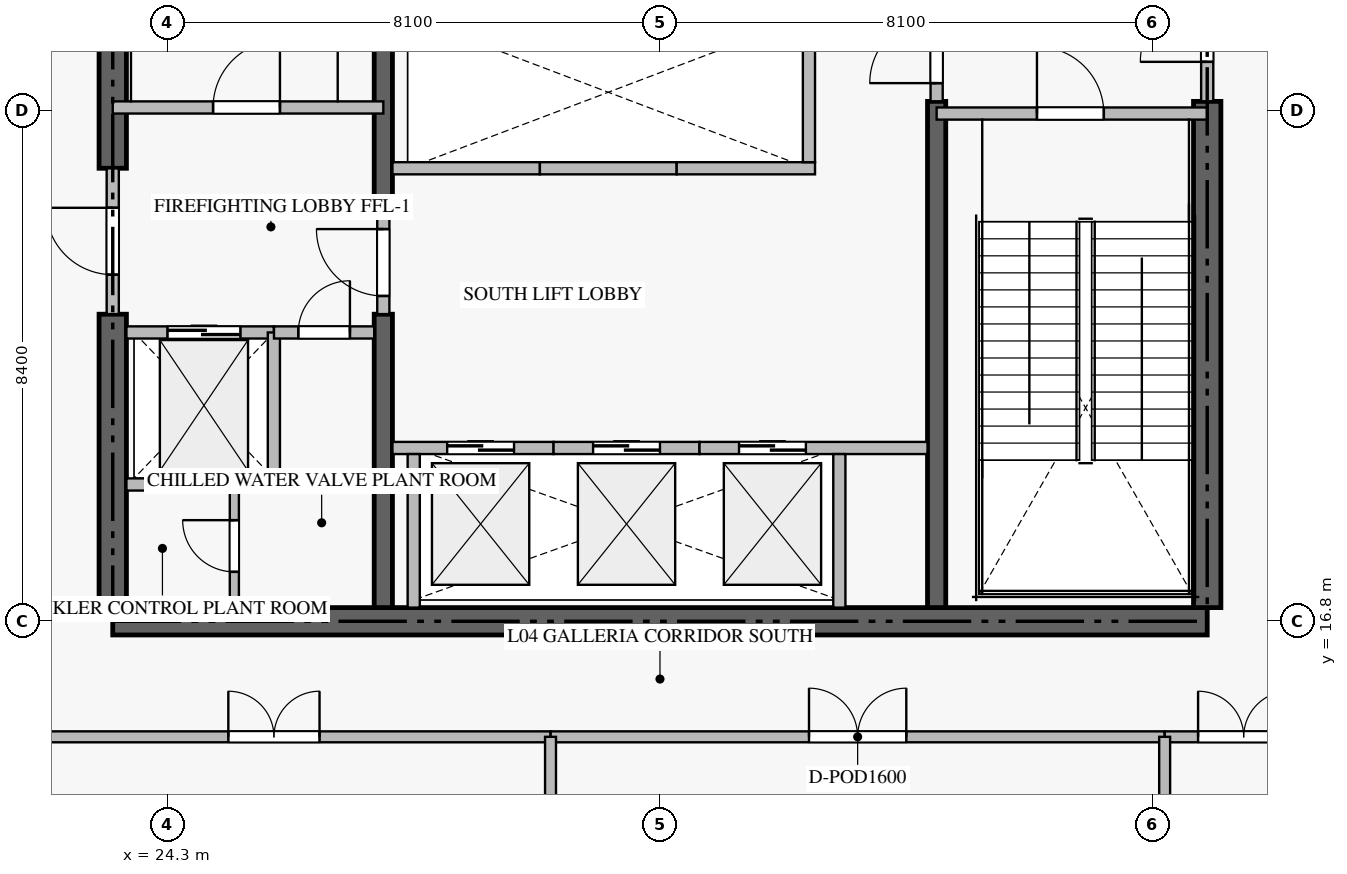
"""IFC4 building model, lengths in metres.
Left out: names, types, materials, properties, quantities, classifications, styles, units other than length and angle.
Written with IfcOpenShell. Run it as: python <this file> out.ifc"""

import sys

from ifc_helpers import new_model, si_unit, direction, frame, frame_2d, origin, place, context, subcontext, project, spatial, rectangle, extrude, source, transform, mapped, element, fill, save


model = new_model("IFC4")
c1 = context("Model", 3, precision=1e-05, world=origin(), true_north=direction((0.0, 1.0)))
c2 = subcontext(c1, "Body", "Model", "MODEL_VIEW")
j1 = project(units=[si_unit("LENGTHUNIT", "METRE"), si_unit("PLANEANGLEUNIT", "RADIAN")], contexts=[c1])
p1 = place(None, origin())
s1 = spatial("IfcSite", under=j1, at=p1, CompositionType="ELEMENT")
p2 = place(p1, origin())
s2 = spatial("IfcBuilding", under=s1, at=p2, CompositionType="ELEMENT")
p3 = place(p2, frame((0.0, 0.0, 21.0)))
s3 = spatial("IfcBuildingStorey", under=s2, at=p3, CompositionType="ELEMENT", Elevation=21.0)
p4 = place(p3, frame((23.4, 16.8, -0.85), z_axis=(0.0, 0.0, 1.0), x_axis=(1.0, 0.0, 0.0)))
e1 = element("IfcWall", 1, at=p4, inside=s3, PredefinedType="SHEAR", context=c2, shape_type="SweptSolid", body=[
    extrude(rectangle(XDim=18.0, YDim=0.45, at=frame_2d((9.0, 0.0))), origin(), (0.0, 0.0, 1.0), 6.108),
])
p5 = place(p3, frame((23.4, 17.025, -0.85), z_axis=(0.0, 0.0, 1.0), x_axis=(0.0, 1.0, 0.0)))
e2 = element("IfcWall", 2, at=p5, inside=s3, PredefinedType="SHEAR", context=c2, shape_type="SweptSolid", body=[
    extrude(rectangle(XDim=4.825, YDim=0.45, at=frame_2d((2.413, 0.0))), origin(), (0.0, 0.0, 1.0), 6.108),
])
p6 = place(p3, frame((23.4, 24.25, -0.85), z_axis=(0.0, 0.0, 1.0), x_axis=(0.0, 1.0, 0.0)))
e3 = element("IfcWall", 3, at=p6, inside=s3, PredefinedType="SHEAR", context=c2, shape_type="SweptSolid", body=[
    extrude(rectangle(XDim=9.125, YDim=0.45, at=frame_2d((4.562, 0.0))), origin(), (0.0, 0.0, 1.0), 6.108),
])
p7 = place(p3, frame((41.4, 17.025, -0.85), z_axis=(0.0, 0.0, 1.0), x_axis=(0.0, 1.0, 0.0)))
e4 = element("IfcWall", 4, at=p7, inside=s3, PredefinedType="SHEAR", context=c2, shape_type="SweptSolid", body=[
    extrude(rectangle(XDim=8.325, YDim=0.45, at=frame_2d((4.163, 0.0))), origin(), (0.0, 0.0, 1.0), 6.108),
])
p8 = place(p3, frame((27.85, 17.025, -0.85), z_axis=(0.0, 0.0, 1.0), x_axis=(0.0, 1.0, 0.0)))
e5 = element("IfcWall", 5, at=p8, inside=s3, PredefinedType="SHEAR", context=c2, shape_type="SweptSolid", body=[
    extrude(rectangle(XDim=4.825, YDim=0.3, at=frame_2d((2.413, 0.0))), origin(), (0.0, 0.0, 1.0), 6.108),
])
p9 = place(p3, frame((27.85, 23.55, -0.85), z_axis=(0.0, 0.0, 1.0), x_axis=(0.0, 1.0, 0.0)))
e6 = element("IfcWall", 6, at=p9, inside=s3, PredefinedType="SHEAR", context=c2, shape_type="SweptSolid", body=[
    extrude(rectangle(XDim=9.825, YDim=0.3, at=frame_2d((4.913, 0.0))), origin(), (0.0, 0.0, 1.0), 6.108),
])
p10 = place(p3, frame((36.95, 17.025, -0.85), z_axis=(0.0, 0.0, 1.0), x_axis=(0.0, 1.0, 0.0)))
e7 = element("IfcWall", 7, at=p10, inside=s3, PredefinedType="SHEAR", context=c2, shape_type="SweptSolid", body=[
    extrude(rectangle(XDim=8.325, YDim=0.3, at=frame_2d((4.163, 0.0))), origin(), (0.0, 0.0, 1.0), 6.108),
])
p11 = place(p3, frame((23.4, 25.25, 0.0), z_axis=(0.0, 0.0, 1.0), x_axis=(1.0, 0.0, 0.0)))
e8 = element("IfcWall", 8, at=p11, inside=s3, PredefinedType="STANDARD", context=c2, shape_type="SweptSolid", body=[
    extrude(rectangle(XDim=4.45, YDim=0.2, at=frame_2d((2.225, 0.0))), origin(), (0.0, 0.0, 1.0), 5.26),
])
p12 = place(p11, frame((1.65, 0.0, 0.0)))
e9 = element("IfcOpeningElement", 9, at=p12, cuts=e8, PredefinedType="OPENING", context=c2, shape_type="SweptSolid", body=[
    extrude(rectangle(XDim=1.1, YDim=2.15, at=frame_2d((0.55, 1.075))), frame((0.0, 0.11, 0.0), z_axis=(0.0, -1.0, 0.0), x_axis=(1.0, 0.0, 0.0)), (0.0, 0.0, 1.0), 0.22),
])
p13 = place(p3, frame((36.95, 25.15, 0.0), z_axis=(0.0, 0.0, 1.0), x_axis=(1.0, 0.0, 0.0)))
e10 = element("IfcWall", 10, at=p13, inside=s3, PredefinedType="STANDARD", context=c2, shape_type="SweptSolid", body=[
    extrude(rectangle(XDim=4.45, YDim=0.2, at=frame_2d((2.225, 0.0))), origin(), (0.0, 0.0, 1.0), 5.26),
])
p14 = place(p13, frame((1.65, 0.0, 0.0)))
e11 = element("IfcOpeningElement", 11, at=p14, cuts=e10, PredefinedType="OPENING", context=c2, shape_type="SweptSolid", body=[
    extrude(rectangle(XDim=1.1, YDim=2.15, at=frame_2d((0.55, 1.075))), frame((0.0, 0.11, 0.0), z_axis=(0.0, -1.0, 0.0), x_axis=(1.0, 0.0, 0.0)), (0.0, 0.0, 1.0), 0.22),
])
p15 = place(p3, frame((23.625, 21.55, 0.0), z_axis=(0.0, 0.0, 1.0), x_axis=(1.0, 0.0, 0.0)))
e12 = element("IfcWall", 12, at=p15, inside=s3, PredefinedType="STANDARD", context=c2, shape_type="SweptSolid", body=[
    extrude(rectangle(XDim=2.425, YDim=0.2, at=frame_2d((1.212, 0.0))), origin(), (0.0, 0.0, 1.0), 5.26),
])
p16 = place(p15, frame((0.675, 0.0, 0.0)))
e13 = element("IfcOpeningElement", 13, at=p16, cuts=e12, PredefinedType="OPENING", context=c2, shape_type="SweptSolid", body=[
    extrude(rectangle(XDim=1.2, YDim=2.2, at=frame_2d((0.6, 1.1))), frame((0.0, 0.11, 0.0), z_axis=(0.0, -1.0, 0.0), x_axis=(1.0, 0.0, 0.0)), (0.0, 0.0, 1.0), 0.22),
])
p17 = place(p3, frame((28.0, 19.65, 0.0), z_axis=(0.0, 0.0, 1.0), x_axis=(1.0, 0.0, 0.0)))
e14 = element("IfcWall", 14, at=p17, inside=s3, PredefinedType="STANDARD", context=c2, shape_type="SweptSolid", body=[
    extrude(rectangle(XDim=2.65, YDim=0.2, at=frame_2d((1.325, 0.0))), origin(), (0.0, 0.0, 1.0), 5.26),
])
p18 = place(p17, frame((0.9, 0.0, 0.0)))
e15 = element("IfcOpeningElement", 15, at=p18, cuts=e14, PredefinedType="OPENING", context=c2, shape_type="SweptSolid", body=[
    extrude(rectangle(XDim=1.1, YDim=2.2, at=frame_2d((0.55, 1.1))), frame((0.0, 0.11, 0.0), z_axis=(0.0, -1.0, 0.0), x_axis=(1.0, 0.0, 0.0)), (0.0, 0.0, 1.0), 0.22),
])
p19 = place(p3, frame((28.35, 17.025, 0.0), z_axis=(0.0, 0.0, 1.0), x_axis=(0.0, 1.0, 0.0)))
e16 = element("IfcWall", 16, at=p19, inside=s3, PredefinedType="STANDARD", context=c2, shape_type="SweptSolid", body=[
    extrude(rectangle(XDim=2.525, YDim=0.2, at=frame_2d((1.263, 0.0))), origin(), (0.0, 0.0, 1.0), 5.26),
])
p20 = place(p3, frame((30.65, 19.65, 0.0), z_axis=(0.0, 0.0, 1.0), x_axis=(1.0, 0.0, 0.0)))
e17 = element("IfcWall", 17, at=p20, inside=s3, PredefinedType="STANDARD", context=c2, shape_type="SweptSolid", body=[
    extrude(rectangle(XDim=2.4, YDim=0.2, at=frame_2d((1.2, 0.0))), origin(), (0.0, 0.0, 1.0), 5.26),
])
p21 = place(p20, frame((0.65, 0.0, 0.0)))
e18 = element("IfcOpeningElement", 18, at=p21, cuts=e17, PredefinedType="OPENING", context=c2, shape_type="SweptSolid", body=[
    extrude(rectangle(XDim=1.1, YDim=2.2, at=frame_2d((0.55, 1.1))), frame((0.0, 0.11, 0.0), z_axis=(0.0, -1.0, 0.0), x_axis=(1.0, 0.0, 0.0)), (0.0, 0.0, 1.0), 0.22),
])
p22 = place(p3, frame((33.05, 19.65, 0.0), z_axis=(0.0, 0.0, 1.0), x_axis=(1.0, 0.0, 0.0)))
e19 = element("IfcWall", 19, at=p22, inside=s3, PredefinedType="STANDARD", context=c2, shape_type="SweptSolid", body=[
    extrude(rectangle(XDim=3.75, YDim=0.2, at=frame_2d((1.875, 0.0))), origin(), (0.0, 0.0, 1.0), 5.26),
])
p23 = place(p22, frame((0.65, 0.0, 0.0)))
e20 = element("IfcOpeningElement", 20, at=p23, cuts=e19, PredefinedType="OPENING", context=c2, shape_type="SweptSolid", body=[
    extrude(rectangle(XDim=1.1, YDim=2.2, at=frame_2d((0.55, 1.1))), frame((0.0, 0.11, 0.0), z_axis=(0.0, -1.0, 0.0), x_axis=(1.0, 0.0, 0.0)), (0.0, 0.0, 1.0), 0.22),
])
p24 = place(p3, frame((35.35, 17.025, 0.0), z_axis=(0.0, 0.0, 1.0), x_axis=(0.0, 1.0, 0.0)))
e21 = element("IfcWall", 21, at=p24, inside=s3, PredefinedType="STANDARD", context=c2, shape_type="SweptSolid", body=[
    extrude(rectangle(XDim=2.525, YDim=0.2, at=frame_2d((1.263, 0.0))), origin(), (0.0, 0.0, 1.0), 5.26),
])
p25 = place(p3, frame((28.0, 24.25, 0.0), z_axis=(0.0, 0.0, 1.0), x_axis=(1.0, 0.0, 0.0)))
e22 = element("IfcWall", 22, at=p25, inside=s3, PredefinedType="STANDARD", context=c2, shape_type="SweptSolid", body=[
    extrude(rectangle(XDim=2.425, YDim=0.2, at=frame_2d((1.212, 0.0))), origin(), (0.0, 0.0, 1.0), 5.26),
])
p26 = place(p3, frame((30.425, 24.25, 0.0), z_axis=(0.0, 0.0, 1.0), x_axis=(1.0, 0.0, 0.0)))
e23 = element("IfcWall", 23, at=p26, inside=s3, PredefinedType="STANDARD", context=c2, shape_type="SweptSolid", body=[
    extrude(rectangle(XDim=2.25, YDim=0.2, at=frame_2d((1.125, 0.0))), origin(), (0.0, 0.0, 1.0), 5.26),
])
p27 = place(p3, frame((32.675, 24.25, 0.0), z_axis=(0.0, 0.0, 1.0), x_axis=(1.0, 0.0, 0.0)))
e24 = element("IfcWall", 24, at=p27, inside=s3, PredefinedType="STANDARD", context=c2, shape_type="SweptSolid", body=[
    extrude(rectangle(XDim=2.275, YDim=0.2, at=frame_2d((1.137, 0.0))), origin(), (0.0, 0.0, 1.0), 5.26),
])
for number, where, z_axis, x_axis in (
    (25, (34.85, 24.35, 0.0), (0.0, 0.0, 1.0), (0.0, 1.0, 0.0)),
    (26, (26.05, 19.05, 0.0), (0.0, 0.0, 1.0), (0.0, 1.0, 0.0)),
):
    element("IfcWall", number, at=place(p3, frame(where, z_axis=z_axis, x_axis=x_axis)), inside=s3, PredefinedType="STANDARD", context=c2, shape_type="SweptSolid", body=[
        extrude(rectangle(XDim=2.5, YDim=0.2, at=frame_2d((1.25, 0.0))), origin(), (0.0, 0.0, 1.0), 5.26),
    ])
p28 = place(p3, frame((23.625, 19.05, 0.0), z_axis=(0.0, 0.0, 1.0), x_axis=(1.0, 0.0, 0.0)))
e27 = element("IfcWall", 27, at=p28, inside=s3, PredefinedType="STANDARD", context=c2, shape_type="SweptSolid", body=[
    extrude(rectangle(XDim=2.425, YDim=0.2, at=frame_2d((1.212, 0.0))), origin(), (0.0, 0.0, 1.0), 5.26),
])
p29 = place(p3, frame((26.052, 21.55, 0.0), z_axis=(0.0, 0.0, 1.0), x_axis=(1.0, 0.0, 0.0)))
e28 = element("IfcWall", 28, at=p29, inside=s3, PredefinedType="STANDARD", context=c2, shape_type="SweptSolid", body=[
    extrude(rectangle(XDim=1.648, YDim=0.2, at=frame_2d((0.824, 0.0))), origin(), (0.0, 0.0, 1.0), 5.26),
])
p30 = place(p29, frame((0.399, 0.0, 0.0)))
e29 = element("IfcOpeningElement", 29, at=p30, cuts=e28, PredefinedType="OPENING", context=c2, shape_type="SweptSolid", body=[
    extrude(rectangle(XDim=0.85, YDim=2.1, at=frame_2d((0.425, 1.05))), frame((0.0, 0.11, 0.0), z_axis=(0.0, -1.0, 0.0), x_axis=(1.0, 0.0, 0.0)), (0.0, 0.0, 1.0), 0.22),
])
p31 = place(p3, frame((23.4, 21.852, 0.0), z_axis=(0.0, 0.0, 1.0), x_axis=(0.0, 1.0, 0.0)))
e30 = element("IfcWall", 30, at=p31, inside=s3, PredefinedType="STANDARD", context=c2, shape_type="SweptSolid", body=[
    extrude(rectangle(XDim=2.396, YDim=0.2, at=frame_2d((1.198, 0.0))), origin(), (0.0, 0.0, 1.0), 5.26),
])
p32 = place(p31, frame((0.648, 0.0, 0.0)))
e31 = element("IfcOpeningElement", 31, at=p32, cuts=e30, PredefinedType="OPENING", context=c2, shape_type="SweptSolid", body=[
    extrude(rectangle(XDim=1.1, YDim=2.15, at=frame_2d((0.55, 1.075))), frame((0.0, 0.11, 0.0), z_axis=(0.0, -1.0, 0.0), x_axis=(1.0, 0.0, 0.0)), (0.0, 0.0, 1.0), 0.22),
])
p33 = place(p3, frame((41.4, 25.352, 0.0), z_axis=(0.0, 0.0, 1.0), x_axis=(0.0, 1.0, 0.0)))
e32 = element("IfcWall", 32, at=p33, inside=s3, PredefinedType="STANDARD", context=c2, shape_type="SweptSolid", body=[
    extrude(rectangle(XDim=2.396, YDim=0.2, at=frame_2d((1.198, 0.0))), origin(), (0.0, 0.0, 1.0), 5.26),
])
p34 = place(p33, frame((0.648, 0.0, 0.0)))
e33 = element("IfcOpeningElement", 33, at=p34, cuts=e32, PredefinedType="OPENING", context=c2, shape_type="SweptSolid", body=[
    extrude(rectangle(XDim=1.1, YDim=2.15, at=frame_2d((0.55, 1.075))), frame((0.0, 0.11, 0.0), z_axis=(0.0, -1.0, 0.0), x_axis=(1.0, 0.0, 0.0)), (0.0, 0.0, 1.0), 0.22),
])
p35 = place(p3, frame((27.85, 21.852, 0.0), z_axis=(0.0, 0.0, 1.0), x_axis=(0.0, 1.0, 0.0)))
e34 = element("IfcWall", 34, at=p35, inside=s3, PredefinedType="STANDARD", context=c2, shape_type="SweptSolid", body=[
    extrude(rectangle(XDim=1.696, YDim=0.2, at=frame_2d((0.848, 0.0))), origin(), (0.0, 0.0, 1.0), 5.26),
])
p36 = place(p35, frame((0.298, 0.0, 0.0)))
e35 = element("IfcOpeningElement", 35, at=p36, cuts=e34, PredefinedType="OPENING", context=c2, shape_type="SweptSolid", body=[
    extrude(rectangle(XDim=1.1, YDim=2.15, at=frame_2d((0.55, 1.075))), frame((0.0, 0.11, 0.0), z_axis=(0.0, -1.0, 0.0), x_axis=(1.0, 0.0, 0.0)), (0.0, 0.0, 1.0), 0.22),
])
p37 = place(p3, frame((36.95, 25.352, 0.0), z_axis=(0.0, 0.0, 1.0), x_axis=(0.0, 1.0, 0.0)))
e36 = element("IfcWall", 36, at=p37, inside=s3, PredefinedType="STANDARD", context=c2, shape_type="SweptSolid", body=[
    extrude(rectangle(XDim=1.696, YDim=0.2, at=frame_2d((0.848, 0.0))), origin(), (0.0, 0.0, 1.0), 5.26),
])
p38 = place(p37, frame((0.298, 0.0, 0.0)))
e37 = element("IfcOpeningElement", 37, at=p38, cuts=e36, PredefinedType="OPENING", context=c2, shape_type="SweptSolid", body=[
    extrude(rectangle(XDim=1.1, YDim=2.15, at=frame_2d((0.55, 1.075))), frame((0.0, 0.11, 0.0), z_axis=(0.0, -1.0, 0.0), x_axis=(1.0, 0.0, 0.0)), (0.0, 0.0, 1.0), 0.22),
])
p39 = place(p3, frame((25.4, 17.025, 0.0), z_axis=(0.0, 0.0, 1.0), x_axis=(0.0, 1.0, 0.0)))
e38 = element("IfcWall", 38, at=p39, inside=s3, PredefinedType="PARTITIONING", context=c2, shape_type="SweptSolid", body=[
    extrude(rectangle(XDim=2.025, YDim=0.15, at=frame_2d((1.013, 0.0))), origin(), (0.0, 0.0, 1.0), 5.26),
])
p40 = place(p39, frame((0.588, 0.0, 0.0)))
e39 = element("IfcOpeningElement", 39, at=p40, cuts=e38, PredefinedType="OPENING", context=c2, shape_type="SweptSolid", body=[
    extrude(rectangle(XDim=0.85, YDim=2.1, at=frame_2d((0.425, 1.05))), frame((0.0, 0.085, 0.0), z_axis=(0.0, -1.0, 0.0), x_axis=(1.0, 0.0, 0.0)), (0.0, 0.0, 1.0), 0.17),
])
p41 = place(p3, frame((21.502, 14.9, 0.0), z_axis=(0.0, 0.0, 1.0), x_axis=(1.0, 0.0, 0.0)))
e40 = element("IfcWall", 40, at=p41, inside=s3, PredefinedType="PARTITIONING", context=c2, shape_type="SweptSolid", body=[
    extrude(rectangle(XDim=9.098, YDim=0.18, at=frame_2d((4.549, 0.0))), origin(), (0.0, 0.0, 1.0), 5.26),
])
p42 = place(p41, frame((3.799, 0.0, 0.0)))
e41 = element("IfcOpeningElement", 41, at=p42, cuts=e40, PredefinedType="OPENING", context=c2, shape_type="SweptSolid", body=[
    extrude(rectangle(XDim=1.5, YDim=2.25, at=frame_2d((0.75, 1.125))), frame((0.0, 0.1, 0.0), z_axis=(0.0, -1.0, 0.0), x_axis=(1.0, 0.0, 0.0)), (0.0, 0.0, 1.0), 0.2),
])
p43 = place(p3, frame((30.602, 14.9, 0.0), z_axis=(0.0, 0.0, 1.0), x_axis=(1.0, 0.0, 0.0)))
e42 = element("IfcWall", 42, at=p43, inside=s3, PredefinedType="PARTITIONING", context=c2, shape_type="SweptSolid", body=[
    extrude(rectangle(XDim=10.098, YDim=0.18, at=frame_2d((5.049, 0.0))), origin(), (0.0, 0.0, 1.0), 5.26),
])
p44 = place(p43, frame((4.249, 0.0, 0.0)))
e43 = element("IfcOpeningElement", 43, at=p44, cuts=e42, PredefinedType="OPENING", context=c2, shape_type="SweptSolid", body=[
    extrude(rectangle(XDim=1.6, YDim=2.3, at=frame_2d((0.8, 1.15))), frame((0.0, 0.1, 0.0), z_axis=(0.0, -1.0, 0.0), x_axis=(1.0, 0.0, 0.0)), (0.0, 0.0, 1.0), 0.2),
])
p45 = place(p3, frame((40.702, 14.9, 0.0), z_axis=(0.0, 0.0, 1.0), x_axis=(1.0, 0.0, 0.0)))
e44 = element("IfcWall", 44, at=p45, inside=s3, PredefinedType="PARTITIONING", context=c2, shape_type="SweptSolid", body=[
    extrude(rectangle(XDim=2.596, YDim=0.18, at=frame_2d((1.298, 0.0))), origin(), (0.0, 0.0, 1.0), 5.26),
])
p46 = place(p45, frame((0.548, 0.0, 0.0)))
e45 = element("IfcOpeningElement", 45, at=p46, cuts=e44, PredefinedType="OPENING", context=c2, shape_type="SweptSolid", body=[
    extrude(rectangle(XDim=1.5, YDim=2.25, at=frame_2d((0.75, 1.125))), frame((0.0, 0.1, 0.0), z_axis=(0.0, -1.0, 0.0), x_axis=(1.0, 0.0, 0.0)), (0.0, 0.0, 1.0), 0.2),
])
for number, where, z_axis, x_axis in (
    (46, (30.6, 4.882, 0.0), (0.0, 0.0, 1.0), (0.0, 1.0, 0.0)),
    (47, (40.7, 4.882, 0.0), (0.0, 0.0, 1.0), (0.0, 1.0, 0.0)),
):
    element("IfcWall", number, at=place(p3, frame(where, z_axis=z_axis, x_axis=x_axis)), inside=s3, PredefinedType="PARTITIONING", context=c2, shape_type="SweptSolid", body=[
        extrude(rectangle(XDim=10.018, YDim=0.18, at=frame_2d((5.009, 0.0))), origin(), (0.0, 0.0, 1.0), 5.26),
    ])
m1 = source(origin(), c2, "Body", "SweptSolid", [
    extrude(rectangle(XDim=1.1, YDim=2.15, at=frame_2d((0.55, 1.075))), frame((0.0, 0.025, 0.0), z_axis=(0.0, -1.0, 0.0), x_axis=(1.0, 0.0, 0.0)), (0.0, 0.0, 1.0), 0.05),
])
p47 = place(p12, origin())
e48 = element("IfcDoor", 48, at=p47, inside=s3, OperationType="SINGLE_SWING_RIGHT", PredefinedType="DOOR", context=c2, shape_type="MappedRepresentation", body=[
    mapped(m1, transform((0.0, 0.0, 0.0), scale=1.0)),
])
fill(e9, e48)
p48 = place(p14, origin())
e49 = element("IfcDoor", 49, at=p48, inside=s3, OperationType="SINGLE_SWING_LEFT", PredefinedType="DOOR", context=c2, shape_type="MappedRepresentation", body=[
    mapped(m1, transform((0.0, 0.0, 0.0), scale=1.0)),
])
fill(e11, e49)
m2 = source(origin(), c2, "Body", "SweptSolid", [
    extrude(rectangle(XDim=1.2, YDim=2.2, at=frame_2d((0.6, 1.1))), frame((0.0, 0.025, 0.0), z_axis=(0.0, -1.0, 0.0), x_axis=(1.0, 0.0, 0.0)), (0.0, 0.0, 1.0), 0.05),
])
p49 = place(p16, origin())
e50 = element("IfcDoor", 50, at=p49, inside=s3, OperationType="DOUBLE_DOOR_SLIDING", PredefinedType="DOOR", context=c2, shape_type="MappedRepresentation", body=[
    mapped(m2, transform((0.0, 0.0, 0.0), scale=1.0)),
])
fill(e13, e50)
m3 = source(origin(), c2, "Body", "SweptSolid", [
    extrude(rectangle(XDim=1.1, YDim=2.2, at=frame_2d((0.55, 1.1))), frame((0.0, 0.025, 0.0), z_axis=(0.0, -1.0, 0.0), x_axis=(1.0, 0.0, 0.0)), (0.0, 0.0, 1.0), 0.05),
])
p50 = place(p18, origin())
e51 = element("IfcDoor", 51, at=p50, inside=s3, OperationType="DOUBLE_DOOR_SLIDING", PredefinedType="DOOR", context=c2, shape_type="MappedRepresentation", body=[
    mapped(m3, transform((0.0, 0.0, 0.0), scale=1.0)),
])
fill(e15, e51)
p51 = place(p21, origin())
e52 = element("IfcDoor", 52, at=p51, inside=s3, OperationType="DOUBLE_DOOR_SLIDING", PredefinedType="DOOR", context=c2, shape_type="MappedRepresentation", body=[
    mapped(m3, transform((0.0, 0.0, 0.0), scale=1.0)),
])
fill(e18, e52)
p52 = place(p23, origin())
e53 = element("IfcDoor", 53, at=p52, inside=s3, OperationType="DOUBLE_DOOR_SLIDING", PredefinedType="DOOR", context=c2, shape_type="MappedRepresentation", body=[
    mapped(m3, transform((0.0, 0.0, 0.0), scale=1.0)),
])
fill(e20, e53)
m4 = source(origin(), c2, "Body", "SweptSolid", [
    extrude(rectangle(XDim=0.85, YDim=2.1, at=frame_2d((0.425, 1.05))), frame((0.0, 0.025, 0.0), z_axis=(0.0, -1.0, 0.0), x_axis=(1.0, 0.0, 0.0)), (0.0, 0.0, 1.0), 0.05),
])
p53 = place(p30, origin())
e54 = element("IfcDoor", 54, at=p53, inside=s3, OperationType="SINGLE_SWING_RIGHT", PredefinedType="DOOR", context=c2, shape_type="MappedRepresentation", body=[
    mapped(m4, transform((0.0, 0.0, 0.0), scale=1.0)),
])
fill(e29, e54)
p54 = place(p32, origin())
e55 = element("IfcDoor", 55, at=p54, inside=s3, OperationType="SINGLE_SWING_RIGHT", PredefinedType="DOOR", context=c2, shape_type="MappedRepresentation", body=[
    mapped(m1, transform((0.0, 0.0, 0.0), scale=1.0)),
])
fill(e31, e55)
p55 = place(p34, origin())
e56 = element("IfcDoor", 56, at=p55, inside=s3, OperationType="SINGLE_SWING_LEFT", PredefinedType="DOOR", context=c2, shape_type="MappedRepresentation", body=[
    mapped(m1, transform((0.0, 0.0, 0.0), scale=1.0)),
])
fill(e33, e56)
p56 = place(p36, origin())
e57 = element("IfcDoor", 57, at=p56, inside=s3, OperationType="SINGLE_SWING_RIGHT", PredefinedType="DOOR", context=c2, shape_type="MappedRepresentation", body=[
    mapped(m1, transform((0.0, 0.0, 0.0), scale=1.0)),
])
fill(e35, e57)
p57 = place(p38, origin())
e58 = element("IfcDoor", 58, at=p57, inside=s3, OperationType="SINGLE_SWING_LEFT", PredefinedType="DOOR", context=c2, shape_type="MappedRepresentation", body=[
    mapped(m1, transform((0.0, 0.0, 0.0), scale=1.0)),
])
fill(e37, e58)
p58 = place(p40, origin())
e59 = element("IfcDoor", 59, at=p58, inside=s3, OperationType="SINGLE_SWING_RIGHT", PredefinedType="DOOR", context=c2, shape_type="MappedRepresentation", body=[
    mapped(m4, transform((0.0, 0.0, 0.0), scale=1.0)),
])
fill(e39, e59)
m5 = source(origin(), c2, "Body", "SweptSolid", [
    extrude(rectangle(XDim=1.5, YDim=2.25, at=frame_2d((0.75, 1.125))), frame((0.0, 0.025, 0.0), z_axis=(0.0, -1.0, 0.0), x_axis=(1.0, 0.0, 0.0)), (0.0, 0.0, 1.0), 0.05),
])
p59 = place(p42, origin())
e60 = element("IfcDoor", 60, at=p59, inside=s3, OperationType="DOUBLE_DOOR_SINGLE_SWING", PredefinedType="DOOR", context=c2, shape_type="MappedRepresentation", body=[
    mapped(m5, transform((0.0, 0.0, 0.0), scale=1.0)),
])
fill(e41, e60)
m6 = source(origin(), c2, "Body", "SweptSolid", [
    extrude(rectangle(XDim=1.6, YDim=2.3, at=frame_2d((0.8, 1.15))), frame((0.0, 0.025, 0.0), z_axis=(0.0, -1.0, 0.0), x_axis=(1.0, 0.0, 0.0)), (0.0, 0.0, 1.0), 0.05),
])
p60 = place(p44, origin())
e61 = element("IfcDoor", 61, at=p60, inside=s3, OperationType="DOUBLE_DOOR_SINGLE_SWING", PredefinedType="DOOR", context=c2, shape_type="MappedRepresentation", body=[
    mapped(m6, transform((0.0, 0.0, 0.0), scale=1.0)),
])
fill(e43, e61)
p61 = place(p46, origin())
e62 = element("IfcDoor", 62, at=p61, inside=s3, OperationType="DOUBLE_DOOR_SINGLE_SWING", PredefinedType="DOOR", context=c2, shape_type="MappedRepresentation", body=[
    mapped(m5, transform((0.0, 0.0, 0.0), scale=1.0)),
])
fill(e45, e62)
save(model, sys.argv[1])
